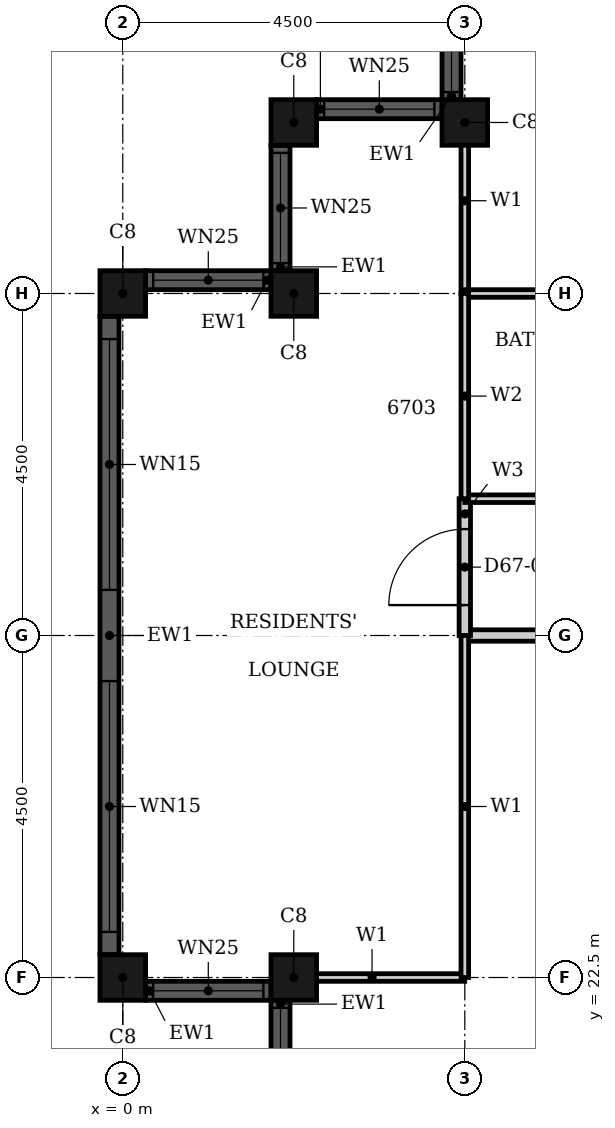
"""IFC4 building model, lengths in metres.
Left out: names, types, materials, properties, quantities, classifications, styles, units other than length and angle.
Written with IfcOpenShell. Run it as: python <this file> out.ifc"""

import sys

from ifc_helpers import new_model, si_unit, direction, frame, frame_2d, origin, origin_2d, place, context, subcontext, project, spatial, rectangle, hollow_rectangle, extrude, element, fill, save


model = new_model("IFC4")
c1 = context("Model", 3, precision=1e-05, world=origin(), true_north=direction((0.0, 1.0)))
c2 = subcontext(c1, "Body", "Model", "MODEL_VIEW")
j1 = project(units=[si_unit("LENGTHUNIT", "METRE"), si_unit("PLANEANGLEUNIT", "RADIAN")], contexts=[c1])
p1 = place(None, origin())
s1 = spatial("IfcSite", under=j1, at=p1, CompositionType="ELEMENT")
p2 = place(p1, origin())
s2 = spatial("IfcBuilding", under=s1, at=p2, CompositionType="ELEMENT")
p3 = place(p2, frame((0.0, 0.0, 263.8)))
s3 = spatial("IfcBuildingStorey", under=s2, at=p3, CompositionType="ELEMENT", Elevation=263.8)
for number, where, z_axis, x_axis in (
    (1, (4.5, 33.75, 0.0), (0.0, 0.0, 1.0), (1.0, 0.0, 0.0)),
    (2, (2.25, 33.75, 0.0), (0.0, 0.0, 1.0), (1.0, 0.0, 0.0)),
    (3, (2.25, 31.5, 0.0), (0.0, 0.0, 1.0), (1.0, 0.0, 0.0)),
    (4, (0.0, 31.5, 0.0), (0.0, 0.0, 1.0), (1.0, 0.0, 0.0)),
    (5, (0.0, 22.5, 0.0), (0.0, 0.0, 1.0), (1.0, 0.0, 0.0)),
    (6, (2.25, 22.5, 0.0), (0.0, 0.0, 1.0), (1.0, 0.0, 0.0)),
):
    element("IfcColumn", number, at=place(p3, frame(where, z_axis=z_axis, x_axis=x_axis)), inside=s3, PredefinedType="COLUMN", context=c2, shape_type="SweptSolid", body=[
        extrude(hollow_rectangle(XDim=0.6, YDim=0.6, WallThickness=0.02, at=origin_2d()), origin(), (0.0, 0.0, 1.0), 3.7),
    ])
p4 = place(p3, frame((4.325, 35.7, 0.0), z_axis=(0.0, 0.0, 1.0), x_axis=(0.0, -1.0, 0.0)))
e7 = element("IfcWall", 7, at=p4, inside=s3, PredefinedType="SOLIDWALL", context=c2, shape_type="SweptSolid", body=[
    extrude(rectangle(XDim=1.65, YDim=0.25, at=frame_2d((0.825, 0.0))), origin(), (0.0, 0.0, 1.0), 3.7),
])
p5 = place(p4, frame((0.1, 0.0, 0.9)))
e8 = element("IfcOpeningElement", 8, at=p5, cuts=e7, PredefinedType="OPENING", context=c2, shape_type="SweptSolid", body=[
    extrude(rectangle(XDim=1.45, YDim=1.85, at=frame_2d((0.725, 0.925))), frame((0.0, 0.135, 0.0), z_axis=(0.0, -1.0, 0.0), x_axis=(1.0, 0.0, 0.0)), (0.0, 0.0, 1.0), 0.27),
])
p6 = place(p3, frame((4.2, 33.925, 0.0), z_axis=(0.0, 0.0, 1.0), x_axis=(-1.0, 0.0, 0.0)))
e9 = element("IfcWall", 9, at=p6, inside=s3, PredefinedType="SOLIDWALL", context=c2, shape_type="SweptSolid", body=[
    extrude(rectangle(XDim=1.65, YDim=0.25, at=frame_2d((0.825, 0.0))), origin(), (0.0, 0.0, 1.0), 3.7),
])
p7 = place(p6, frame((0.1, 0.0, 0.9)))
e10 = element("IfcOpeningElement", 10, at=p7, cuts=e9, PredefinedType="OPENING", context=c2, shape_type="SweptSolid", body=[
    extrude(rectangle(XDim=1.45, YDim=1.85, at=frame_2d((0.725, 0.925))), frame((0.0, 0.135, 0.0), z_axis=(0.0, -1.0, 0.0), x_axis=(1.0, 0.0, 0.0)), (0.0, 0.0, 1.0), 0.27),
])
p8 = place(p3, frame((2.075, 33.45, 0.0), z_axis=(0.0, 0.0, 1.0), x_axis=(0.0, -1.0, 0.0)))
e11 = element("IfcWall", 11, at=p8, inside=s3, PredefinedType="SOLIDWALL", context=c2, shape_type="SweptSolid", body=[
    extrude(rectangle(XDim=1.65, YDim=0.25, at=frame_2d((0.825, 0.0))), origin(), (0.0, 0.0, 1.0), 3.7),
])
p9 = place(p8, frame((0.1, 0.0, 0.9)))
e12 = element("IfcOpeningElement", 12, at=p9, cuts=e11, PredefinedType="OPENING", context=c2, shape_type="SweptSolid", body=[
    extrude(rectangle(XDim=1.45, YDim=1.85, at=frame_2d((0.725, 0.925))), frame((0.0, 0.135, 0.0), z_axis=(0.0, -1.0, 0.0), x_axis=(1.0, 0.0, 0.0)), (0.0, 0.0, 1.0), 0.27),
])
p10 = place(p3, frame((1.95, 31.675, 0.0), z_axis=(0.0, 0.0, 1.0), x_axis=(-1.0, 0.0, 0.0)))
e13 = element("IfcWall", 13, at=p10, inside=s3, PredefinedType="SOLIDWALL", context=c2, shape_type="SweptSolid", body=[
    extrude(rectangle(XDim=1.65, YDim=0.25, at=frame_2d((0.825, 0.0))), origin(), (0.0, 0.0, 1.0), 3.7),
])
p11 = place(p10, frame((0.1, 0.0, 0.9)))
e14 = element("IfcOpeningElement", 14, at=p11, cuts=e13, PredefinedType="OPENING", context=c2, shape_type="SweptSolid", body=[
    extrude(rectangle(XDim=1.45, YDim=1.85, at=frame_2d((0.725, 0.925))), frame((0.0, 0.135, 0.0), z_axis=(0.0, -1.0, 0.0), x_axis=(1.0, 0.0, 0.0)), (0.0, 0.0, 1.0), 0.27),
])
p12 = place(p3, frame((-0.175, 31.2, 0.0), z_axis=(0.0, 0.0, 1.0), x_axis=(0.0, -1.0, 0.0)))
e15 = element("IfcWall", 15, at=p12, inside=s3, PredefinedType="SOLIDWALL", context=c2, shape_type="SweptSolid", body=[
    extrude(rectangle(XDim=8.4, YDim=0.25, at=frame_2d((4.2, 0.0))), origin(), (0.0, 0.0, 1.0), 3.7),
])
p13 = place(p12, frame((0.3, 0.0, 0.45)))
e16 = element("IfcOpeningElement", 16, at=p13, cuts=e15, PredefinedType="OPENING", context=c2, shape_type="SweptSolid", body=[
    extrude(rectangle(XDim=3.3, YDim=2.3, at=frame_2d((1.65, 1.15))), frame((0.0, 0.135, 0.0), z_axis=(0.0, -1.0, 0.0), x_axis=(1.0, 0.0, 0.0)), (0.0, 0.0, 1.0), 0.27),
])
p14 = place(p12, frame((4.8, 0.0, 0.45)))
e17 = element("IfcOpeningElement", 17, at=p14, cuts=e15, PredefinedType="OPENING", context=c2, shape_type="SweptSolid", body=[
    extrude(rectangle(XDim=3.3, YDim=2.3, at=frame_2d((1.65, 1.15))), frame((0.0, 0.135, 0.0), z_axis=(0.0, -1.0, 0.0), x_axis=(1.0, 0.0, 0.0)), (0.0, 0.0, 1.0), 0.27),
])
p15 = place(p3, frame((0.3, 22.325, 0.0), z_axis=(0.0, 0.0, 1.0), x_axis=(1.0, 0.0, 0.0)))
e18 = element("IfcWall", 18, at=p15, inside=s3, PredefinedType="SOLIDWALL", context=c2, shape_type="SweptSolid", body=[
    extrude(rectangle(XDim=1.65, YDim=0.25, at=frame_2d((0.825, 0.0))), origin(), (0.0, 0.0, 1.0), 3.7),
])
p16 = place(p15, frame((0.1, 0.0, 0.9)))
e19 = element("IfcOpeningElement", 19, at=p16, cuts=e18, PredefinedType="OPENING", context=c2, shape_type="SweptSolid", body=[
    extrude(rectangle(XDim=1.45, YDim=1.85, at=frame_2d((0.725, 0.925))), frame((0.0, 0.135, 0.0), z_axis=(0.0, -1.0, 0.0), x_axis=(1.0, 0.0, 0.0)), (0.0, 0.0, 1.0), 0.27),
])
p17 = place(p3, frame((2.075, 22.2, 0.0), z_axis=(0.0, 0.0, 1.0), x_axis=(0.0, -1.0, 0.0)))
e20 = element("IfcWall", 20, at=p17, inside=s3, PredefinedType="SOLIDWALL", context=c2, shape_type="SweptSolid", body=[
    extrude(rectangle(XDim=1.65, YDim=0.25, at=frame_2d((0.825, 0.0))), origin(), (0.0, 0.0, 1.0), 3.7),
])
p18 = place(p17, frame((0.1, 0.0, 0.9)))
e21 = element("IfcOpeningElement", 21, at=p18, cuts=e20, PredefinedType="OPENING", context=c2, shape_type="SweptSolid", body=[
    extrude(rectangle(XDim=1.45, YDim=1.85, at=frame_2d((0.725, 0.925))), frame((0.0, 0.135, 0.0), z_axis=(0.0, -1.0, 0.0), x_axis=(1.0, 0.0, 0.0)), (0.0, 0.0, 1.0), 0.27),
])
p19 = place(p3, frame((4.5, 27.0, 0.0), z_axis=(0.0, 0.0, 1.0), x_axis=(1.0, 0.0, 0.0)))
e22 = element("IfcWall", 22, at=p19, inside=s3, PredefinedType="PARTITIONING", context=c2, shape_type="SweptSolid", body=[
    extrude(rectangle(XDim=13.5, YDim=0.15, at=frame_2d((6.75, 0.0))), origin(), (0.0, 0.0, 1.0), 2.68),
])
p20 = place(p19, frame((5.35, 0.0, 0.0)))
e23 = element("IfcOpeningElement", 23, at=p20, cuts=e22, PredefinedType="OPENING", context=c2, shape_type="SweptSolid", body=[
    extrude(rectangle(XDim=1.0, YDim=2.1, at=frame_2d((0.5, 1.05))), frame((0.0, 0.085, 0.0), z_axis=(0.0, -1.0, 0.0), x_axis=(1.0, 0.0, 0.0)), (0.0, 0.0, 1.0), 0.17),
])
p21 = place(p3, frame((4.5, 27.0, 0.0), z_axis=(0.0, 0.0, 1.0), x_axis=(0.0, 1.0, 0.0)))
e24 = element("IfcWall", 24, at=p21, inside=s3, PredefinedType="PARTITIONING", context=c2, shape_type="SweptSolid", body=[
    extrude(rectangle(XDim=1.8, YDim=0.15, at=frame_2d((0.9, 0.0))), origin(), (0.0, 0.0, 1.0), 3.4),
])
p22 = place(p21, frame((0.4, 0.0, 0.0)))
e25 = element("IfcOpeningElement", 25, at=p22, cuts=e24, PredefinedType="OPENING", context=c2, shape_type="SweptSolid", body=[
    extrude(rectangle(XDim=1.0, YDim=2.1, at=frame_2d((0.5, 1.05))), frame((0.0, 0.085, 0.0), z_axis=(0.0, -1.0, 0.0), x_axis=(1.0, 0.0, 0.0)), (0.0, 0.0, 1.0), 0.17),
])
p23 = place(p3, frame((2.06, 22.5, 0.0), z_axis=(0.0, 0.0, 1.0), x_axis=(1.0, 0.0, 0.0)))
e26 = element("IfcWall", 26, at=p23, inside=s3, PredefinedType="PARTITIONING", context=c2, shape_type="SweptSolid", body=[
    extrude(rectangle(XDim=2.439, YDim=0.1, at=frame_2d((1.219, 0.0))), origin(), (0.0, 0.0, 1.0), 2.68),
])
p24 = place(p3, frame((4.5, 31.501, 0.0), z_axis=(0.0, 0.0, 1.0), x_axis=(0.0, 1.0, 0.0)))
e27 = element("IfcWall", 27, at=p24, inside=s3, PredefinedType="PARTITIONING", context=c2, shape_type="SweptSolid", body=[
    extrude(rectangle(XDim=2.439, YDim=0.1, at=frame_2d((1.219, 0.0))), origin(), (0.0, 0.0, 1.0), 3.4),
])
p25 = place(p3, frame((4.5, 22.5, 0.0), z_axis=(0.0, 0.0, 1.0), x_axis=(0.0, 1.0, 0.0)))
e28 = element("IfcWall", 28, at=p25, inside=s3, PredefinedType="PARTITIONING", context=c2, shape_type="SweptSolid", body=[
    extrude(rectangle(XDim=4.5, YDim=0.1, at=frame_2d((2.25, 0.0))), origin(), (0.0, 0.0, 1.0), 3.4),
])
p26 = place(p3, frame((4.5, 28.8, 0.0), z_axis=(0.0, 0.0, 1.0), x_axis=(1.0, 0.0, 0.0)))
e29 = element("IfcWall", 29, at=p26, inside=s3, PredefinedType="PARTITIONING", context=c2, shape_type="SweptSolid", body=[
    extrude(rectangle(XDim=2.4, YDim=0.1, at=frame_2d((1.2, 0.0))), origin(), (0.0, 0.0, 1.0), 3.4),
])
p27 = place(p3, frame((4.5, 31.5, 0.0), z_axis=(0.0, 0.0, 1.0), x_axis=(1.0, 0.0, 0.0)))
e30 = element("IfcWall", 30, at=p27, inside=s3, PredefinedType="PARTITIONING", context=c2, shape_type="SweptSolid", body=[
    extrude(rectangle(XDim=2.4, YDim=0.1, at=frame_2d((1.2, 0.0))), origin(), (0.0, 0.0, 1.0), 2.68),
])
p28 = place(p3, frame((4.5, 28.8, 0.0), z_axis=(0.0, 0.0, 1.0), x_axis=(0.0, 1.0, 0.0)))
e31 = element("IfcWall", 31, at=p28, inside=s3, PredefinedType="PARTITIONING", context=c2, shape_type="SweptSolid", body=[
    extrude(rectangle(XDim=2.7, YDim=0.1, at=frame_2d((1.35, 0.0))), origin(), (0.0, 0.0, 1.0), 3.4),
])
p29 = place(p5, origin())
e32 = element("IfcWindow", 32, at=p29, inside=s3, PartitioningType="SINGLE_PANEL", PredefinedType="WINDOW", context=c2, shape_type="SweptSolid", body=[
    extrude(rectangle(XDim=1.45, YDim=1.85, at=frame_2d((0.725, 0.925))), frame((0.0, 0.03, 0.0), z_axis=(0.0, -1.0, 0.0), x_axis=(1.0, 0.0, 0.0)), (0.0, 0.0, 1.0), 0.06),
])
fill(e8, e32)
p30 = place(p7, origin())
e33 = element("IfcWindow", 33, at=p30, inside=s3, PartitioningType="SINGLE_PANEL", PredefinedType="WINDOW", context=c2, shape_type="SweptSolid", body=[
    extrude(rectangle(XDim=1.45, YDim=1.85, at=frame_2d((0.725, 0.925))), frame((0.0, 0.03, 0.0), z_axis=(0.0, -1.0, 0.0), x_axis=(1.0, 0.0, 0.0)), (0.0, 0.0, 1.0), 0.06),
])
fill(e10, e33)
p31 = place(p9, origin())
e34 = element("IfcWindow", 34, at=p31, inside=s3, PartitioningType="SINGLE_PANEL", PredefinedType="WINDOW", context=c2, shape_type="SweptSolid", body=[
    extrude(rectangle(XDim=1.45, YDim=1.85, at=frame_2d((0.725, 0.925))), frame((0.0, 0.03, 0.0), z_axis=(0.0, -1.0, 0.0), x_axis=(1.0, 0.0, 0.0)), (0.0, 0.0, 1.0), 0.06),
])
fill(e12, e34)
p32 = place(p11, origin())
e35 = element("IfcWindow", 35, at=p32, inside=s3, PartitioningType="SINGLE_PANEL", PredefinedType="WINDOW", context=c2, shape_type="SweptSolid", body=[
    extrude(rectangle(XDim=1.45, YDim=1.85, at=frame_2d((0.725, 0.925))), frame((0.0, 0.03, 0.0), z_axis=(0.0, -1.0, 0.0), x_axis=(1.0, 0.0, 0.0)), (0.0, 0.0, 1.0), 0.06),
])
fill(e14, e35)
p33 = place(p13, origin())
e36 = element("IfcWindow", 36, at=p33, inside=s3, PartitioningType="SINGLE_PANEL", PredefinedType="WINDOW", context=c2, shape_type="SweptSolid", body=[
    extrude(rectangle(XDim=3.3, YDim=2.3, at=frame_2d((1.65, 1.15))), frame((0.0, 0.03, 0.0), z_axis=(0.0, -1.0, 0.0), x_axis=(1.0, 0.0, 0.0)), (0.0, 0.0, 1.0), 0.06),
])
fill(e16, e36)
p34 = place(p14, origin())
e37 = element("IfcWindow", 37, at=p34, inside=s3, PartitioningType="SINGLE_PANEL", PredefinedType="WINDOW", context=c2, shape_type="SweptSolid", body=[
    extrude(rectangle(XDim=3.3, YDim=2.3, at=frame_2d((1.65, 1.15))), frame((0.0, 0.03, 0.0), z_axis=(0.0, -1.0, 0.0), x_axis=(1.0, 0.0, 0.0)), (0.0, 0.0, 1.0), 0.06),
])
fill(e17, e37)
p35 = place(p16, origin())
e38 = element("IfcWindow", 38, at=p35, inside=s3, PartitioningType="SINGLE_PANEL", PredefinedType="WINDOW", context=c2, shape_type="SweptSolid", body=[
    extrude(rectangle(XDim=1.45, YDim=1.85, at=frame_2d((0.725, 0.925))), frame((0.0, 0.03, 0.0), z_axis=(0.0, -1.0, 0.0), x_axis=(1.0, 0.0, 0.0)), (0.0, 0.0, 1.0), 0.06),
])
fill(e19, e38)
p36 = place(p18, origin())
e39 = element("IfcWindow", 39, at=p36, inside=s3, PartitioningType="SINGLE_PANEL", PredefinedType="WINDOW", context=c2, shape_type="SweptSolid", body=[
    extrude(rectangle(XDim=1.45, YDim=1.85, at=frame_2d((0.725, 0.925))), frame((0.0, 0.03, 0.0), z_axis=(0.0, -1.0, 0.0), x_axis=(1.0, 0.0, 0.0)), (0.0, 0.0, 1.0), 0.06),
])
fill(e21, e39)
p37 = place(p22, origin())
e40 = element("IfcDoor", 40, at=p37, inside=s3, OperationType="SINGLE_SWING_LEFT", PredefinedType="DOOR", context=c2, shape_type="SweptSolid", body=[
    extrude(rectangle(XDim=1.0, YDim=2.1, at=frame_2d((0.5, 1.05))), frame((0.0, 0.025, 0.0), z_axis=(0.0, -1.0, 0.0), x_axis=(1.0, 0.0, 0.0)), (0.0, 0.0, 1.0), 0.05),
])
fill(e25, e40)
save(model, sys.argv[1])
